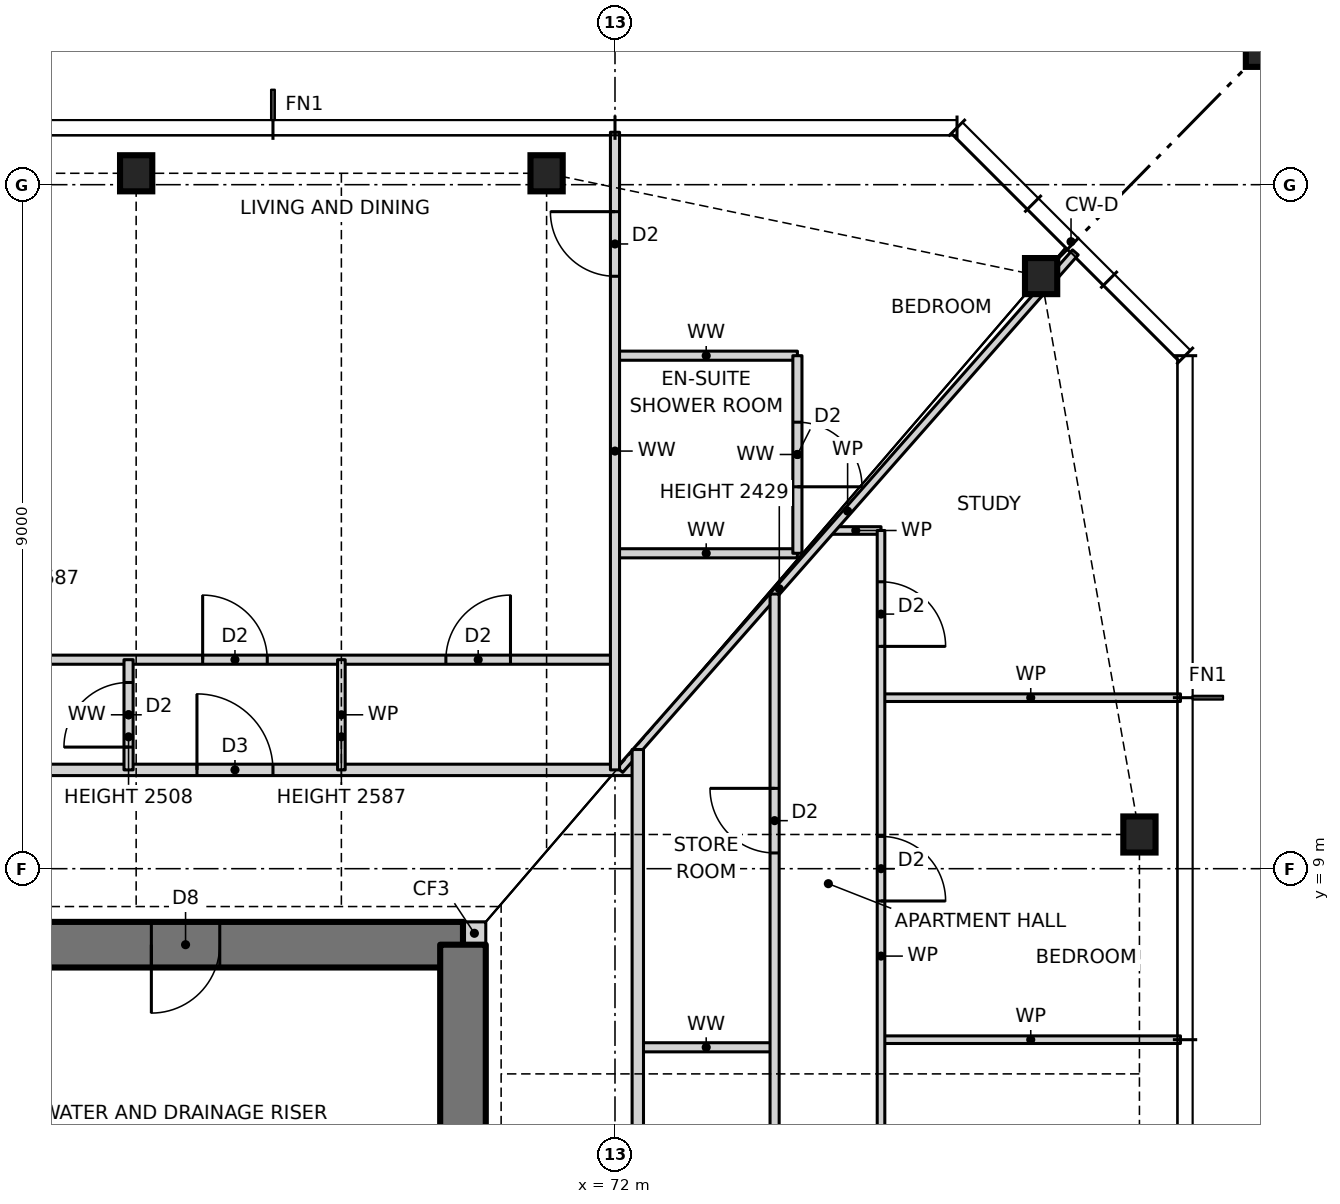
"""IFC4 building model, lengths in metres.
Left out: names, types, materials, properties, quantities, classifications, styles, units other than length and angle.
Written with IfcOpenShell. Run it as: python <this file> out.ifc"""

import sys

from ifc_helpers import new_model, si_unit, direction, frame, frame_2d, origin, origin_2d, place, context, subcontext, project, spatial, rectangle, hollow_rectangle, i_section, extrude, element, fill, save


model = new_model("IFC4")
c1 = context("Model", 3, precision=1e-05, world=origin(), true_north=direction((0.0, 1.0)))
c2 = subcontext(c1, "Body", "Model", "MODEL_VIEW")
j1 = project(units=[si_unit("LENGTHUNIT", "METRE"), si_unit("PLANEANGLEUNIT", "RADIAN")], contexts=[c1])
p1 = place(None, origin())
s1 = spatial("IfcSite", under=j1, at=p1, CompositionType="ELEMENT")
p2 = place(p1, origin())
s2 = spatial("IfcBuilding", under=s1, at=p2, CompositionType="ELEMENT")
p3 = place(p2, frame((0.0, 0.0, 53.5)))
s3 = spatial("IfcBuildingStorey", under=s2, at=p3, CompositionType="ELEMENT", Elevation=53.5)
for number, where, z_axis, x_axis in (
    (1, (78.9, 9.45, 0.0), (0.0, 0.0, 1.0), (1.0, 0.0, 0.0)),
    (2, (77.606, 16.797, 0.0), (0.0, 0.0, 1.0), (1.0, 0.0, 0.0)),
    (3, (71.1, 18.15, 0.0), (0.0, 0.0, 1.0), (1.0, 0.0, 0.0)),
    (4, (65.7, 18.15, 0.0), (0.0, 0.0, 1.0), (1.0, 0.0, 0.0)),
):
    element("IfcColumn", number, at=place(p3, frame(where, z_axis=z_axis, x_axis=x_axis)), inside=s3, PredefinedType="COLUMN", context=c2, shape_type="SweptSolid", body=[
        extrude(i_section(OverallWidth=0.424, OverallDepth=0.475, WebThickness=0.048, FlangeThickness=0.077, at=origin_2d()), origin(), (0.0, 0.0, 1.0), 3.5),
    ])
p4 = place(p3, frame((80.9, 20.15, 0.0), z_axis=(0.0, 0.0, 1.0), x_axis=(1.0, 0.0, 0.0)))
e5 = element("IfcColumn", 5, at=p4, inside=s3, PredefinedType="COLUMN", context=c2, shape_type="SweptSolid", body=[
    extrude(hollow_rectangle(XDim=1.2, YDim=1.2, WallThickness=0.07, at=origin_2d()), origin(), (0.0, 0.0, 1.0), 3.5),
])
p5 = place(p3, frame((70.0, 8.15, 0.0), z_axis=(0.0, 0.0, 1.0), x_axis=(1.0, 0.0, 0.0)))
e6 = element("IfcWall", 6, at=p5, inside=s3, PredefinedType="SOLIDWALL", context=c2, shape_type="SweptSolid", body=[
    extrude(rectangle(XDim=0.3, YDim=0.3, at=frame_2d((0.15, 0.0))), origin(), (0.0, 0.0, 1.0), 3.5),
])
p6 = place(p3, frame((70.0, 8.0, 0.0), z_axis=(0.0, 0.0, 1.0), x_axis=(-1.0, 0.0, 0.0)))
e7 = element("IfcWall", 7, at=p6, inside=s3, PredefinedType="SHEAR", context=c2, shape_type="SweptSolid", body=[
    extrude(rectangle(XDim=14.0, YDim=0.6, at=frame_2d((7.0, 0.0))), origin(), (0.0, 0.0, 1.0), 3.5),
])
p7 = place(p6, frame((8.2, 0.0, 0.0)))
e8 = element("IfcOpeningElement", 8, at=p7, cuts=e7, PredefinedType="OPENING", context=c2, shape_type="SweptSolid", body=[
    extrude(rectangle(XDim=0.9, YDim=2.1, at=frame_2d((0.45, 1.05))), frame((0.0, 0.31, 0.0), z_axis=(0.0, -1.0, 0.0), x_axis=(1.0, 0.0, 0.0)), (0.0, 0.0, 1.0), 0.62),
])
p8 = place(p6, frame((3.2, 0.0, 0.0)))
e9 = element("IfcOpeningElement", 9, at=p8, cuts=e7, PredefinedType="OPENING", context=c2, shape_type="SweptSolid", body=[
    extrude(rectangle(XDim=0.9, YDim=2.1, at=frame_2d((0.45, 1.05))), frame((0.0, 0.31, 0.0), z_axis=(0.0, -1.0, 0.0), x_axis=(1.0, 0.0, 0.0)), (0.0, 0.0, 1.0), 0.62),
])
p9 = place(p3, frame((70.0, -8.0, 0.0), z_axis=(0.0, 0.0, 1.0), x_axis=(0.0, 1.0, 0.0)))
e10 = element("IfcWall", 10, at=p9, inside=s3, PredefinedType="SHEAR", context=c2, shape_type="SweptSolid", body=[
    extrude(rectangle(XDim=16.0, YDim=0.6, at=frame_2d((8.0, 0.0))), origin(), (0.0, 0.0, 1.0), 3.5),
])
p10 = place(p9, frame((7.5, 0.0, 0.0)))
e11 = element("IfcOpeningElement", 11, at=p10, cuts=e10, PredefinedType="OPENING", context=c2, shape_type="SweptSolid", body=[
    extrude(rectangle(XDim=1.0, YDim=2.1, at=frame_2d((0.5, 1.05))), frame((0.0, 0.31, 0.0), z_axis=(0.0, -1.0, 0.0), x_axis=(1.0, 0.0, 0.0)), (0.0, 0.0, 1.0), 0.62),
])
p11 = place(p3, frame((72.3, 6.65, 0.0), z_axis=(0.0, 0.0, 1.0), x_axis=(1.0, 0.0, 0.0)))
e12 = element("IfcWall", 12, at=p11, inside=s3, PredefinedType="PARTITIONING", context=c2, shape_type="SweptSolid", body=[
    extrude(rectangle(XDim=1.8, YDim=0.12, at=frame_2d((0.9, 0.0))), origin(), (0.0, 0.0, 1.0), 3.27),
])
p12 = place(p3, frame((75.5, 6.75, 0.0), z_axis=(0.0, 0.0, 1.0), x_axis=(1.0, 0.0, 0.0)))
e13 = element("IfcWall", 13, at=p12, inside=s3, PredefinedType="PARTITIONING", context=c2, shape_type="SweptSolid", body=[
    extrude(rectangle(XDim=3.94, YDim=0.1, at=frame_2d((1.97, 0.0))), origin(), (0.0, 0.0, 1.0), 3.27),
])
p13 = place(p3, frame((53.7, 10.3, 0.0), z_axis=(0.0, 0.0, 1.0), x_axis=(1.0, 0.0, 0.0)))
e14 = element("IfcWall", 14, at=p13, inside=s3, PredefinedType="PARTITIONING", context=c2, shape_type="SweptSolid", body=[
    extrude(rectangle(XDim=18.6, YDim=0.15, at=frame_2d((9.3, 0.0))), origin(), (0.0, 0.0, 1.0), 3.27),
])
p14 = place(p13, frame((12.8, 0.0, 0.0)))
e15 = element("IfcOpeningElement", 15, at=p14, cuts=e14, PredefinedType="OPENING", context=c2, shape_type="SweptSolid", body=[
    extrude(rectangle(XDim=1.0, YDim=2.1, at=frame_2d((0.5, 1.05))), frame((0.0, 0.085, 0.0), z_axis=(0.0, -1.0, 0.0), x_axis=(1.0, 0.0, 0.0)), (0.0, 0.0, 1.0), 0.17),
])
p15 = place(p3, frame((75.5, 11.25, 0.0), z_axis=(0.0, 0.0, 1.0), x_axis=(1.0, 0.0, 0.0)))
e16 = element("IfcWall", 16, at=p15, inside=s3, PredefinedType="PARTITIONING", context=c2, shape_type="SweptSolid", body=[
    extrude(rectangle(XDim=3.94, YDim=0.1, at=frame_2d((1.97, 0.0))), origin(), (0.0, 0.0, 1.0), 3.27),
])
p16 = place(p3, frame((52.66, 11.75, 0.0), z_axis=(0.0, 0.0, 1.0), x_axis=(1.0, 0.0, 0.0)))
e17 = element("IfcWall", 17, at=p16, inside=s3, PredefinedType="PARTITIONING", context=c2, shape_type="SweptSolid", body=[
    extrude(rectangle(XDim=19.34, YDim=0.12, at=frame_2d((9.67, 0.0))), origin(), (0.0, 0.0, 1.0), 3.27),
])
p17 = place(p16, frame((17.115, 0.0, 0.0)))
e18 = element("IfcOpeningElement", 18, at=p17, cuts=e17, PredefinedType="OPENING", context=c2, shape_type="SweptSolid", body=[
    extrude(rectangle(XDim=0.85, YDim=2.1, at=frame_2d((0.425, 1.05))), frame((0.0, 0.07, 0.0), z_axis=(0.0, -1.0, 0.0), x_axis=(1.0, 0.0, 0.0)), (0.0, 0.0, 1.0), 0.14),
])
p18 = place(p16, frame((13.915, 0.0, 0.0)))
e19 = element("IfcOpeningElement", 19, at=p18, cuts=e17, PredefinedType="OPENING", context=c2, shape_type="SweptSolid", body=[
    extrude(rectangle(XDim=0.85, YDim=2.1, at=frame_2d((0.425, 1.05))), frame((0.0, 0.07, 0.0), z_axis=(0.0, -1.0, 0.0), x_axis=(1.0, 0.0, 0.0)), (0.0, 0.0, 1.0), 0.14),
])
p19 = place(p16, frame((7.165, 0.0, 0.0)))
e20 = element("IfcOpeningElement", 20, at=p19, cuts=e17, PredefinedType="OPENING", context=c2, shape_type="SweptSolid", body=[
    extrude(rectangle(XDim=0.85, YDim=2.1, at=frame_2d((0.425, 1.05))), frame((0.0, 0.07, 0.0), z_axis=(0.0, -1.0, 0.0), x_axis=(1.0, 0.0, 0.0)), (0.0, 0.0, 1.0), 0.14),
])
p20 = place(p16, frame((1.995, 0.0, 0.0)))
e21 = element("IfcOpeningElement", 21, at=p20, cuts=e17, PredefinedType="OPENING", context=c2, shape_type="SweptSolid", body=[
    extrude(rectangle(XDim=0.85, YDim=2.1, at=frame_2d((0.425, 1.05))), frame((0.0, 0.07, 0.0), z_axis=(0.0, -1.0, 0.0), x_axis=(1.0, 0.0, 0.0)), (0.0, 0.0, 1.0), 0.14),
])
p21 = place(p3, frame((72.0, 13.15, 0.0), z_axis=(0.0, 0.0, 1.0), x_axis=(1.0, 0.0, 0.0)))
e22 = element("IfcWall", 22, at=p21, inside=s3, PredefinedType="PARTITIONING", context=c2, shape_type="SweptSolid", body=[
    extrude(rectangle(XDim=2.4, YDim=0.12, at=frame_2d((1.2, 0.0))), origin(), (0.0, 0.0, 1.0), 3.27),
])
p22 = place(p3, frame((74.836, 13.45, 0.0), z_axis=(0.0, 0.0, 1.0), x_axis=(1.0, 0.0, 0.0)))
e23 = element("IfcWall", 23, at=p22, inside=s3, PredefinedType="PARTITIONING", context=c2, shape_type="SweptSolid", body=[
    extrude(rectangle(XDim=0.664, YDim=0.1, at=frame_2d((0.332, 0.0))), origin(), (0.0, 0.0, 1.0), 3.27),
])
p23 = place(p3, frame((72.0, 15.75, 0.0), z_axis=(0.0, 0.0, 1.0), x_axis=(1.0, 0.0, 0.0)))
e24 = element("IfcWall", 24, at=p23, inside=s3, PredefinedType="PARTITIONING", context=c2, shape_type="SweptSolid", body=[
    extrude(rectangle(XDim=2.4, YDim=0.12, at=frame_2d((1.2, 0.0))), origin(), (0.0, 0.0, 1.0), 3.27),
])
p24 = place(p3, frame((72.064, 10.3, 0.0), z_axis=(0.0, 0.0, 1.0), x_axis=(0.660700699661, 0.750649442461, 0.0)))
e25 = element("IfcWall", 25, at=p24, inside=s3, PredefinedType="PARTITIONING", context=c2, shape_type="SweptSolid", body=[
    extrude(rectangle(XDim=9.071, YDim=0.1, at=frame_2d((4.535, 0.0))), origin(), (0.0, 0.0, 1.0), 2.429),
])
p25 = place(p3, frame((75.5, 2.25, 0.0), z_axis=(0.0, 0.0, 1.0), x_axis=(0.0, 1.0, 0.0)))
e26 = element("IfcWall", 26, at=p25, inside=s3, PredefinedType="PARTITIONING", context=c2, shape_type="SweptSolid", body=[
    extrude(rectangle(XDim=11.2, YDim=0.1, at=frame_2d((5.6, 0.0))), origin(), (0.0, 0.0, 1.0), 3.27),
])
p26 = place(p25, frame((1.825, 0.0, 0.0)))
e27 = element("IfcOpeningElement", 27, at=p26, cuts=e26, PredefinedType="OPENING", context=c2, shape_type="SweptSolid", body=[
    extrude(rectangle(XDim=0.85, YDim=2.1, at=frame_2d((0.425, 1.05))), frame((0.0, 0.06, 0.0), z_axis=(0.0, -1.0, 0.0), x_axis=(1.0, 0.0, 0.0)), (0.0, 0.0, 1.0), 0.12),
])
p27 = place(p25, frame((6.325, 0.0, 0.0)))
e28 = element("IfcOpeningElement", 28, at=p27, cuts=e26, PredefinedType="OPENING", context=c2, shape_type="SweptSolid", body=[
    extrude(rectangle(XDim=0.85, YDim=2.1, at=frame_2d((0.425, 1.05))), frame((0.0, 0.06, 0.0), z_axis=(0.0, -1.0, 0.0), x_axis=(1.0, 0.0, 0.0)), (0.0, 0.0, 1.0), 0.12),
])
p28 = place(p25, frame((9.675, 0.0, 0.0)))
e29 = element("IfcOpeningElement", 29, at=p28, cuts=e26, PredefinedType="OPENING", context=c2, shape_type="SweptSolid", body=[
    extrude(rectangle(XDim=0.85, YDim=2.1, at=frame_2d((0.425, 1.05))), frame((0.0, 0.06, 0.0), z_axis=(0.0, -1.0, 0.0), x_axis=(1.0, 0.0, 0.0)), (0.0, 0.0, 1.0), 0.12),
])
p29 = place(p3, frame((74.4, 13.15, 0.0), z_axis=(0.0, 0.0, 1.0), x_axis=(0.0, 1.0, 0.0)))
e30 = element("IfcWall", 30, at=p29, inside=s3, PredefinedType="PARTITIONING", context=c2, shape_type="SweptSolid", body=[
    extrude(rectangle(XDim=2.6, YDim=0.12, at=frame_2d((1.3, 0.0))), origin(), (0.0, 0.0, 1.0), 3.27),
])
p30 = place(p29, frame((0.875, 0.0, 0.0)))
e31 = element("IfcOpeningElement", 31, at=p30, cuts=e30, PredefinedType="OPENING", context=c2, shape_type="SweptSolid", body=[
    extrude(rectangle(XDim=0.85, YDim=2.1, at=frame_2d((0.425, 1.05))), frame((0.0, 0.07, 0.0), z_axis=(0.0, -1.0, 0.0), x_axis=(1.0, 0.0, 0.0)), (0.0, 0.0, 1.0), 0.14),
])
p31 = place(p3, frame((74.1, -12.614, 0.0), z_axis=(0.0, 0.0, 1.0), x_axis=(0.0, 1.0, 0.0)))
e32 = element("IfcWall", 32, at=p31, inside=s3, PredefinedType="PARTITIONING", context=c2, shape_type="SweptSolid", body=[
    extrude(rectangle(XDim=25.228, YDim=0.12, at=frame_2d((12.614, 0.0))), origin(), (0.0, 0.0, 1.0), 3.27),
])
p32 = place(p31, frame((7.239, 0.0, 0.0)))
e33 = element("IfcOpeningElement", 33, at=p32, cuts=e32, PredefinedType="OPENING", context=c2, shape_type="SweptSolid", body=[
    extrude(rectangle(XDim=0.85, YDim=2.1, at=frame_2d((0.425, 1.05))), frame((0.0, 0.07, 0.0), z_axis=(0.0, -1.0, 0.0), x_axis=(1.0, 0.0, 0.0)), (0.0, 0.0, 1.0), 0.14),
])
p33 = place(p31, frame((10.439, 0.0, 0.0)))
e34 = element("IfcOpeningElement", 34, at=p33, cuts=e32, PredefinedType="OPENING", context=c2, shape_type="SweptSolid", body=[
    extrude(rectangle(XDim=0.85, YDim=2.1, at=frame_2d((0.425, 1.05))), frame((0.0, 0.07, 0.0), z_axis=(0.0, -1.0, 0.0), x_axis=(1.0, 0.0, 0.0)), (0.0, 0.0, 1.0), 0.14),
])
p34 = place(p31, frame((2.507, 0.0, 0.0)))
e35 = element("IfcOpeningElement", 35, at=p34, cuts=e32, PredefinedType="OPENING", context=c2, shape_type="SweptSolid", body=[
    extrude(rectangle(XDim=0.85, YDim=2.1, at=frame_2d((0.425, 1.05))), frame((0.0, 0.07, 0.0), z_axis=(0.0, -1.0, 0.0), x_axis=(1.0, 0.0, 0.0)), (0.0, 0.0, 1.0), 0.14),
])
p35 = place(p31, frame((16.639, 0.0, 0.0)))
e36 = element("IfcOpeningElement", 36, at=p35, cuts=e32, PredefinedType="OPENING", context=c2, shape_type="SweptSolid", body=[
    extrude(rectangle(XDim=0.85, YDim=2.1, at=frame_2d((0.425, 1.05))), frame((0.0, 0.07, 0.0), z_axis=(0.0, -1.0, 0.0), x_axis=(1.0, 0.0, 0.0)), (0.0, 0.0, 1.0), 0.14),
])
p36 = place(p31, frame((21.821, 0.0, 0.0)))
e37 = element("IfcOpeningElement", 37, at=p36, cuts=e32, PredefinedType="OPENING", context=c2, shape_type="SweptSolid", body=[
    extrude(rectangle(XDim=0.85, YDim=2.1, at=frame_2d((0.425, 1.05))), frame((0.0, 0.07, 0.0), z_axis=(0.0, -1.0, 0.0), x_axis=(1.0, 0.0, 0.0)), (0.0, 0.0, 1.0), 0.14),
])
p37 = place(p3, frame((72.3, -10.568, 0.0), z_axis=(0.0, 0.0, 1.0), x_axis=(0.0, 1.0, 0.0)))
e38 = element("IfcWall", 38, at=p37, inside=s3, PredefinedType="PARTITIONING", context=c2, shape_type="SweptSolid", body=[
    extrude(rectangle(XDim=21.136, YDim=0.15, at=frame_2d((10.568, 0.0))), origin(), (0.0, 0.0, 1.0), 3.27),
])
p38 = place(p37, frame((8.318, 0.0, 0.0)))
e39 = element("IfcOpeningElement", 39, at=p38, cuts=e38, PredefinedType="OPENING", context=c2, shape_type="SweptSolid", body=[
    extrude(rectangle(XDim=1.0, YDim=2.1, at=frame_2d((0.5, 1.05))), frame((0.0, 0.085, 0.0), z_axis=(0.0, -1.0, 0.0), x_axis=(1.0, 0.0, 0.0)), (0.0, 0.0, 1.0), 0.17),
])
p39 = place(p3, frame((72.0, 10.3, 0.0), z_axis=(0.0, 0.0, 1.0), x_axis=(0.0, 1.0, 0.0)))
e40 = element("IfcWall", 40, at=p39, inside=s3, PredefinedType="PARTITIONING", context=c2, shape_type="SweptSolid", body=[
    extrude(rectangle(XDim=8.39, YDim=0.12, at=frame_2d((4.195, 0.0))), origin(), (0.0, 0.0, 1.0), 3.27),
])
p40 = place(p39, frame((6.495, 0.0, 0.0)))
e41 = element("IfcOpeningElement", 41, at=p40, cuts=e40, PredefinedType="OPENING", context=c2, shape_type="SweptSolid", body=[
    extrude(rectangle(XDim=0.85, YDim=2.1, at=frame_2d((0.425, 1.05))), frame((0.0, 0.07, 0.0), z_axis=(0.0, -1.0, 0.0), x_axis=(1.0, 0.0, 0.0)), (0.0, 0.0, 1.0), 0.14),
])
p41 = place(p3, frame((68.4, 10.3, 0.0), z_axis=(0.0, 0.0, 1.0), x_axis=(0.0, 1.0, 0.0)))
e42 = element("IfcWall", 42, at=p41, inside=s3, PredefinedType="PARTITIONING", context=c2, shape_type="SweptSolid", body=[
    extrude(rectangle(XDim=1.45, YDim=0.1, at=frame_2d((0.725, 0.0))), origin(), (0.0, 0.0, 1.0), 2.587),
])
p42 = place(p3, frame((65.6, 10.3, 0.0), z_axis=(0.0, 0.0, 1.0), x_axis=(0.0, 1.0, 0.0)))
e43 = element("IfcWall", 43, at=p42, inside=s3, PredefinedType="PARTITIONING", context=c2, shape_type="SweptSolid", body=[
    extrude(rectangle(XDim=1.45, YDim=0.12, at=frame_2d((0.725, 0.0))), origin(), (0.0, 0.0, 1.0), 2.508),
])
p43 = place(p42, frame((0.3, 0.0, 0.0)))
e44 = element("IfcOpeningElement", 44, at=p43, cuts=e43, PredefinedType="OPENING", context=c2, shape_type="SweptSolid", body=[
    extrude(rectangle(XDim=0.85, YDim=2.1, at=frame_2d((0.425, 1.05))), frame((0.0, 0.07, 0.0), z_axis=(0.0, -1.0, 0.0), x_axis=(1.0, 0.0, 0.0)), (0.0, 0.0, 1.0), 0.14),
])
p44 = place(p27, frame((0.85, 0.0, 0.0), z_axis=(0.0, 0.0, 1.0), x_axis=(-1.0, 0.0, 0.0)))
e45 = element("IfcDoor", 45, at=p44, inside=s3, OperationType="SINGLE_SWING_RIGHT", PredefinedType="DOOR", context=c2, shape_type="SweptSolid", body=[
    extrude(rectangle(XDim=0.85, YDim=2.1, at=frame_2d((0.425, 1.05))), frame((0.0, 0.025, 0.0), z_axis=(0.0, -1.0, 0.0), x_axis=(1.0, 0.0, 0.0)), (0.0, 0.0, 1.0), 0.05),
])
fill(e28, e45)
p45 = place(p28, frame((0.85, 0.0, 0.0), z_axis=(0.0, 0.0, 1.0), x_axis=(-1.0, 0.0, 0.0)))
e46 = element("IfcDoor", 46, at=p45, inside=s3, OperationType="SINGLE_SWING_RIGHT", PredefinedType="DOOR", context=c2, shape_type="SweptSolid", body=[
    extrude(rectangle(XDim=0.85, YDim=2.1, at=frame_2d((0.425, 1.05))), frame((0.0, 0.025, 0.0), z_axis=(0.0, -1.0, 0.0), x_axis=(1.0, 0.0, 0.0)), (0.0, 0.0, 1.0), 0.05),
])
fill(e29, e46)
p46 = place(p36, origin())
e47 = element("IfcDoor", 47, at=p46, inside=s3, OperationType="SINGLE_SWING_RIGHT", PredefinedType="DOOR", context=c2, shape_type="SweptSolid", body=[
    extrude(rectangle(XDim=0.85, YDim=2.1, at=frame_2d((0.425, 1.05))), frame((0.0, 0.025, 0.0), z_axis=(0.0, -1.0, 0.0), x_axis=(1.0, 0.0, 0.0)), (0.0, 0.0, 1.0), 0.05),
])
fill(e37, e47)
p47 = place(p17, origin())
e48 = element("IfcDoor", 48, at=p47, inside=s3, OperationType="SINGLE_SWING_RIGHT", PredefinedType="DOOR", context=c2, shape_type="SweptSolid", body=[
    extrude(rectangle(XDim=0.85, YDim=2.1, at=frame_2d((0.425, 1.05))), frame((0.0, 0.025, 0.0), z_axis=(0.0, -1.0, 0.0), x_axis=(1.0, 0.0, 0.0)), (0.0, 0.0, 1.0), 0.05),
])
fill(e18, e48)
p48 = place(p14, origin())
e49 = element("IfcDoor", 49, at=p48, inside=s3, OperationType="SINGLE_SWING_LEFT", PredefinedType="DOOR", context=c2, shape_type="SweptSolid", body=[
    extrude(rectangle(XDim=1.0, YDim=2.1, at=frame_2d((0.5, 1.05))), frame((0.0, 0.025, 0.0), z_axis=(0.0, -1.0, 0.0), x_axis=(1.0, 0.0, 0.0)), (0.0, 0.0, 1.0), 0.05),
])
fill(e15, e49)
p49 = place(p18, origin())
e50 = element("IfcDoor", 50, at=p49, inside=s3, OperationType="SINGLE_SWING_LEFT", PredefinedType="DOOR", context=c2, shape_type="SweptSolid", body=[
    extrude(rectangle(XDim=0.85, YDim=2.1, at=frame_2d((0.425, 1.05))), frame((0.0, 0.025, 0.0), z_axis=(0.0, -1.0, 0.0), x_axis=(1.0, 0.0, 0.0)), (0.0, 0.0, 1.0), 0.05),
])
fill(e19, e50)
p50 = place(p43, origin())
e51 = element("IfcDoor", 51, at=p50, inside=s3, OperationType="SINGLE_SWING_LEFT", PredefinedType="DOOR", context=c2, shape_type="SweptSolid", body=[
    extrude(rectangle(XDim=0.85, YDim=2.1, at=frame_2d((0.425, 1.05))), frame((0.0, 0.025, 0.0), z_axis=(0.0, -1.0, 0.0), x_axis=(1.0, 0.0, 0.0)), (0.0, 0.0, 1.0), 0.05),
])
fill(e44, e51)
p51 = place(p30, frame((0.85, 0.0, 0.0), z_axis=(0.0, 0.0, 1.0), x_axis=(-1.0, 0.0, 0.0)))
e52 = element("IfcDoor", 52, at=p51, inside=s3, OperationType="SINGLE_SWING_RIGHT", PredefinedType="DOOR", context=c2, shape_type="SweptSolid", body=[
    extrude(rectangle(XDim=0.85, YDim=2.1, at=frame_2d((0.425, 1.05))), frame((0.0, 0.025, 0.0), z_axis=(0.0, -1.0, 0.0), x_axis=(1.0, 0.0, 0.0)), (0.0, 0.0, 1.0), 0.05),
])
fill(e31, e52)
p52 = place(p40, origin())
e53 = element("IfcDoor", 53, at=p52, inside=s3, OperationType="SINGLE_SWING_RIGHT", PredefinedType="DOOR", context=c2, shape_type="SweptSolid", body=[
    extrude(rectangle(XDim=0.85, YDim=2.1, at=frame_2d((0.425, 1.05))), frame((0.0, 0.025, 0.0), z_axis=(0.0, -1.0, 0.0), x_axis=(1.0, 0.0, 0.0)), (0.0, 0.0, 1.0), 0.05),
])
fill(e41, e53)
p53 = place(p8, origin())
e54 = element("IfcDoor", 54, at=p53, inside=s3, OperationType="SINGLE_SWING_RIGHT", PredefinedType="DOOR", context=c2, shape_type="SweptSolid", body=[
    extrude(rectangle(XDim=0.9, YDim=2.1, at=frame_2d((0.45, 1.05))), frame((0.0, 0.025, 0.0), z_axis=(0.0, -1.0, 0.0), x_axis=(1.0, 0.0, 0.0)), (0.0, 0.0, 1.0), 0.05),
])
fill(e9, e54)
save(model, sys.argv[1])
